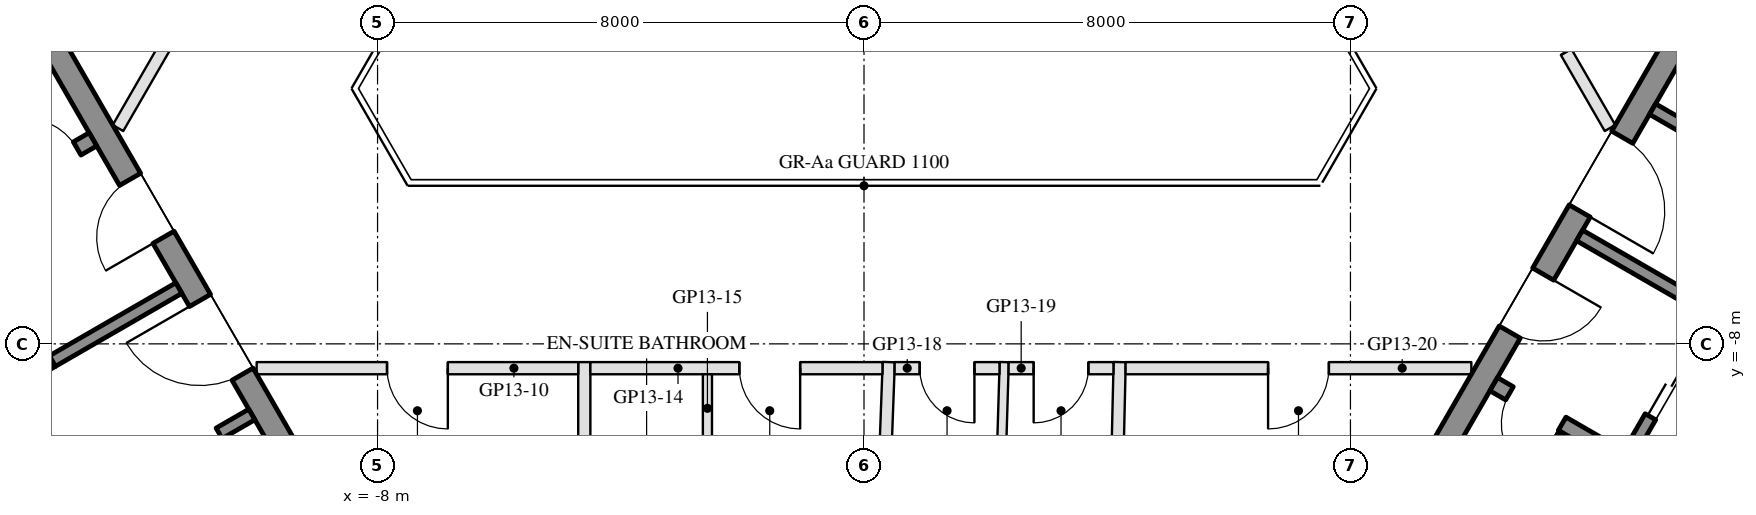
"""IFC4 building model, lengths in metres.
Left out: names, types, materials, properties, quantities, classifications, styles, units other than length and angle.
Written with IfcOpenShell. Run it as: python <this file> out.ifc"""

import sys

from ifc_helpers import new_model, si_unit, direction, frame, frame_2d, origin, place, context, subcontext, project, spatial, rectangle, extrude, element, fill, save


model = new_model("IFC4")
c1 = context("Model", 3, precision=1e-05, world=origin(), true_north=direction((0.0, 1.0)))
c2 = subcontext(c1, "Body", "Model", "MODEL_VIEW")
j1 = project(units=[si_unit("LENGTHUNIT", "METRE"), si_unit("PLANEANGLEUNIT", "RADIAN")], contexts=[c1])
p1 = place(None, origin())
s1 = spatial("IfcSite", under=j1, at=p1, CompositionType="ELEMENT")
p2 = place(p1, origin())
s2 = spatial("IfcBuilding", under=s1, at=p2, CompositionType="ELEMENT")
p3 = place(p2, frame((0.0, 0.0, 157.7)))
s3 = spatial("IfcBuildingStorey", under=s2, at=p3, CompositionType="ELEMENT", Elevation=157.7)
p4 = place(p3, frame((-13.845, -2.22, 0.0), z_axis=(0.0, 0.0, 1.0), x_axis=(0.500004234368, -0.866022959057, 0.0)))
e1 = element("IfcWall", 1, at=p4, inside=s3, PredefinedType="SHEAR", context=c2, shape_type="SweptSolid", body=[
    extrude(rectangle(XDim=10.0, YDim=0.4, at=frame_2d((5.0, 0.0))), origin(), (0.0, 0.0, 1.0), 3.5),
])
p5 = place(p4, frame((3.55, 0.0, 0.0)))
e2 = element("IfcOpeningElement", 2, at=p5, cuts=e1, PredefinedType="OPENING", context=c2, shape_type="SweptSolid", body=[
    extrude(rectangle(XDim=1.1, YDim=2.1, at=frame_2d((0.55, 1.05))), frame((0.0, 0.21, 0.0), z_axis=(0.0, -1.0, 0.0), x_axis=(1.0, 0.0, 0.0)), (0.0, 0.0, 1.0), 0.42),
])
p6 = place(p4, frame((5.85, 0.0, 0.0)))
e3 = element("IfcOpeningElement", 3, at=p6, cuts=e1, PredefinedType="OPENING", context=c2, shape_type="SweptSolid", body=[
    extrude(rectangle(XDim=1.4, YDim=2.1, at=frame_2d((0.7, 1.05))), frame((0.0, 0.21, 0.0), z_axis=(0.0, -1.0, 0.0), x_axis=(1.0, 0.0, 0.0)), (0.0, 0.0, 1.0), 0.42),
])
p7 = place(p3, frame((-12.681, -4.636, 0.0), z_axis=(0.0, 0.0, 1.0), x_axis=(-0.866021702275, -0.500006411147, 0.0)))
e4 = element("IfcWall", 4, at=p7, inside=s3, PredefinedType="SHEAR", context=c2, shape_type="SweptSolid", body=[
    extrude(rectangle(XDim=6.45, YDim=0.25, at=frame_2d((3.225, 0.0))), origin(), (0.0, 0.0, 1.0), 3.5),
])
p8 = place(p7, frame((0.3, 0.0, 0.0)))
e5 = element("IfcOpeningElement", 5, at=p8, cuts=e4, PredefinedType="OPENING", context=c2, shape_type="SweptSolid", body=[
    extrude(rectangle(XDim=1.0, YDim=2.1, at=frame_2d((0.5, 1.05))), frame((0.0, 0.135, 0.0), z_axis=(0.0, -1.0, 0.0), x_axis=(1.0, 0.0, 0.0)), (0.0, 0.0, 1.0), 0.27),
])
p9 = place(p3, frame((-14.783, -5.995, 0.0), z_axis=(0.0, 0.0, 1.0), x_axis=(0.49994636267, -0.866056369097, 0.0)))
e6 = element("IfcWall", 6, at=p9, inside=s3, PredefinedType="SHEAR", context=c2, shape_type="SweptSolid", body=[
    extrude(rectangle(XDim=2.8, YDim=0.2, at=frame_2d((1.4, 0.0))), origin(), (0.0, 0.0, 1.0), 3.5),
])
p10 = place(p9, frame((0.7, 0.0, 0.0)))
e7 = element("IfcOpeningElement", 7, at=p10, cuts=e6, PredefinedType="OPENING", context=c2, shape_type="SweptSolid", body=[
    extrude(rectangle(XDim=1.2, YDim=2.1, at=frame_2d((0.6, 1.05))), frame((0.0, 0.11, 0.0), z_axis=(0.0, -1.0, 0.0), x_axis=(1.0, 0.0, 0.0)), (0.0, 0.0, 1.0), 0.22),
])
p11 = place(p3, frame((-11.268, -7.083, 0.0), z_axis=(0.0, 0.0, 1.0), x_axis=(-0.866050077142, -0.499957262057, 0.0)))
e8 = element("IfcWall", 8, at=p11, inside=s3, PredefinedType="SHEAR", context=c2, shape_type="SweptSolid", body=[
    extrude(rectangle(XDim=2.4, YDim=0.2, at=frame_2d((1.2, 0.0))), origin(), (0.0, 0.0, 1.0), 3.5),
])
p12 = place(p3, frame((-10.068, -9.162, 0.0), z_axis=(0.0, 0.0, 1.0), x_axis=(-0.866032725843, -0.499987317609, 0.0)))
e9 = element("IfcWall", 9, at=p12, inside=s3, PredefinedType="SHEAR", context=c2, shape_type="SweptSolid", body=[
    extrude(rectangle(XDim=10.16, YDim=0.2, at=frame_2d((5.08, 0.0))), origin(), (0.0, 0.0, 1.0), 3.5),
])
p13 = place(p12, frame((0.62, 0.0, 0.0)))
e10 = element("IfcOpeningElement", 10, at=p13, cuts=e9, PredefinedType="OPENING", context=c2, shape_type="SweptSolid", body=[
    extrude(rectangle(XDim=1.1, YDim=2.1, at=frame_2d((0.55, 1.05))), frame((0.0, 0.11, 0.0), z_axis=(0.0, -1.0, 0.0), x_axis=(1.0, 0.0, 0.0)), (0.0, 0.0, 1.0), 0.22),
])
p14 = place(p12, frame((3.16, 0.0, 0.0)))
e11 = element("IfcOpeningElement", 11, at=p14, cuts=e9, PredefinedType="OPENING", context=c2, shape_type="SweptSolid", body=[
    extrude(rectangle(XDim=1.1, YDim=2.1, at=frame_2d((0.55, 1.05))), frame((0.0, 0.11, 0.0), z_axis=(0.0, -1.0, 0.0), x_axis=(1.0, 0.0, 0.0)), (0.0, 0.0, 1.0), 0.22),
])
p15 = place(p12, frame((5.7, 0.0, 0.0)))
e12 = element("IfcOpeningElement", 12, at=p15, cuts=e9, PredefinedType="OPENING", context=c2, shape_type="SweptSolid", body=[
    extrude(rectangle(XDim=1.1, YDim=2.1, at=frame_2d((0.55, 1.05))), frame((0.0, 0.11, 0.0), z_axis=(0.0, -1.0, 0.0), x_axis=(1.0, 0.0, 0.0)), (0.0, 0.0, 1.0), 0.22),
])
p16 = place(p12, frame((8.24, 0.0, 0.0)))
e13 = element("IfcOpeningElement", 13, at=p16, cuts=e9, PredefinedType="OPENING", context=c2, shape_type="SweptSolid", body=[
    extrude(rectangle(XDim=1.1, YDim=2.1, at=frame_2d((0.55, 1.05))), frame((0.0, 0.11, 0.0), z_axis=(0.0, -1.0, 0.0), x_axis=(1.0, 0.0, 0.0)), (0.0, 0.0, 1.0), 0.22),
])
p17 = place(p3, frame((8.845, -10.88, 0.0), z_axis=(0.0, 0.0, 1.0), x_axis=(0.500004234368, 0.866022959057, 0.0)))
e14 = element("IfcWall", 14, at=p17, inside=s3, PredefinedType="SHEAR", context=c2, shape_type="SweptSolid", body=[
    extrude(rectangle(XDim=10.0, YDim=0.4, at=frame_2d((5.0, 0.0))), origin(), (0.0, 0.0, 1.0), 3.5),
])
p18 = place(p17, frame((3.55, 0.0, 0.0)))
e15 = element("IfcOpeningElement", 15, at=p18, cuts=e14, PredefinedType="OPENING", context=c2, shape_type="SweptSolid", body=[
    extrude(rectangle(XDim=1.1, YDim=2.1, at=frame_2d((0.55, 1.05))), frame((0.0, 0.21, 0.0), z_axis=(0.0, -1.0, 0.0), x_axis=(1.0, 0.0, 0.0)), (0.0, 0.0, 1.0), 0.42),
])
p19 = place(p17, frame((5.85, 0.0, 0.0)))
e16 = element("IfcOpeningElement", 16, at=p19, cuts=e14, PredefinedType="OPENING", context=c2, shape_type="SweptSolid", body=[
    extrude(rectangle(XDim=1.4, YDim=2.1, at=frame_2d((0.7, 1.05))), frame((0.0, 0.21, 0.0), z_axis=(0.0, -1.0, 0.0), x_axis=(1.0, 0.0, 0.0)), (0.0, 0.0, 1.0), 0.42),
])
p20 = place(p3, frame((10.356, -8.664, 0.0), z_axis=(0.0, 0.0, 1.0), x_axis=(0.866028629588, -0.499994412703, 0.0)))
e17 = element("IfcWall", 17, at=p20, inside=s3, PredefinedType="SHEAR", context=c2, shape_type="SweptSolid", body=[
    extrude(rectangle(XDim=6.45, YDim=0.25, at=frame_2d((3.225, 0.0))), origin(), (0.0, 0.0, 1.0), 3.5),
])
p21 = place(p20, frame((0.3, 0.0, 0.0)))
e18 = element("IfcOpeningElement", 18, at=p21, cuts=e17, PredefinedType="OPENING", context=c2, shape_type="SweptSolid", body=[
    extrude(rectangle(XDim=1.0, YDim=2.1, at=frame_2d((0.5, 1.05))), frame((0.0, 0.135, 0.0), z_axis=(0.0, -1.0, 0.0), x_axis=(1.0, 0.0, 0.0)), (0.0, 0.0, 1.0), 0.27),
])
p22 = place(p3, frame((12.583, -9.805, 0.0), z_axis=(0.0, 0.0, 1.0), x_axis=(0.49994636267, 0.866056369097, 0.0)))
e19 = element("IfcWall", 19, at=p22, inside=s3, PredefinedType="SHEAR", context=c2, shape_type="SweptSolid", body=[
    extrude(rectangle(XDim=2.8, YDim=0.2, at=frame_2d((1.4, 0.0))), origin(), (0.0, 0.0, 1.0), 3.5),
])
p23 = place(p22, frame((0.7, 0.0, 0.0)))
e20 = element("IfcOpeningElement", 20, at=p23, cuts=e19, PredefinedType="OPENING", context=c2, shape_type="SweptSolid", body=[
    extrude(rectangle(XDim=1.2, YDim=2.1, at=frame_2d((0.6, 1.05))), frame((0.0, 0.11, 0.0), z_axis=(0.0, -1.0, 0.0), x_axis=(1.0, 0.0, 0.0)), (0.0, 0.0, 1.0), 0.22),
])
p24 = place(p3, frame((11.768, -6.217, 0.0), z_axis=(0.0, 0.0, 1.0), x_axis=(0.866050077142, -0.499957262057, 0.0)))
e21 = element("IfcWall", 21, at=p24, inside=s3, PredefinedType="SHEAR", context=c2, shape_type="SweptSolid", body=[
    extrude(rectangle(XDim=2.4, YDim=0.2, at=frame_2d((1.2, 0.0))), origin(), (0.0, 0.0, 1.0), 3.5),
])
p25 = place(p3, frame((12.968, -4.138, 0.0), z_axis=(0.0, 0.0, 1.0), x_axis=(0.866028328073, -0.49999493495, 0.0)))
e22 = element("IfcWall", 22, at=p25, inside=s3, PredefinedType="SHEAR", context=c2, shape_type="SweptSolid", body=[
    extrude(rectangle(XDim=10.16, YDim=0.2, at=frame_2d((5.08, 0.0))), origin(), (0.0, 0.0, 1.0), 3.5),
])
p26 = place(p25, frame((4.53, 0.0, 0.0)))
e23 = element("IfcOpeningElement", 23, at=p26, cuts=e22, PredefinedType="OPENING", context=c2, shape_type="SweptSolid", body=[
    extrude(rectangle(XDim=0.9, YDim=2.1, at=frame_2d((0.45, 1.05))), frame((0.0, 0.11, 0.0), z_axis=(0.0, -1.0, 0.0), x_axis=(1.0, 0.0, 0.0)), (0.0, 0.0, 1.0), 0.22),
])
p27 = place(p3, frame((-4.6, -18.38, 0.0), z_axis=(0.0, 0.0, 1.0), x_axis=(0.0, 1.0, 0.0)))
e24 = element("IfcWall", 24, at=p27, inside=s3, PredefinedType="PARTITIONING", context=c2, shape_type="SweptSolid", body=[
    extrude(rectangle(XDim=10.08, YDim=0.2, at=frame_2d((5.04, 0.0))), origin(), (0.0, 0.0, 1.0), 3.06),
])
p28 = place(p3, frame((0.055, -17.805, 0.0), z_axis=(0.0, 0.0, 1.0), x_axis=(0.037090458059, 0.999311912228, 0.0)))
e25 = element("IfcWall", 25, at=p28, inside=s3, PredefinedType="PARTITIONING", context=c2, shape_type="SweptSolid", body=[
    extrude(rectangle(XDim=9.511, YDim=0.2, at=frame_2d((4.756, 0.0))), origin(), (0.0, 0.0, 1.0), 2.95),
])
p29 = place(p3, frame((3.95, -19.28, 0.0), z_axis=(0.0, 0.0, 1.0), x_axis=(0.023184943176, 0.999731193076, 0.0)))
e26 = element("IfcWall", 26, at=p29, inside=s3, PredefinedType="PARTITIONING", context=c2, shape_type="SweptSolid", body=[
    extrude(rectangle(XDim=10.983, YDim=0.2, at=frame_2d((5.491, 0.0))), origin(), (0.0, 0.0, 1.0), 2.95),
])
p30 = place(p3, frame((-4.7, -8.4, 0.0), z_axis=(0.0, 0.0, 1.0), x_axis=(-1.0, 0.0, 0.0)))
e27 = element("IfcWall", 27, at=p30, inside=s3, PredefinedType="PARTITIONING", context=c2, shape_type="SweptSolid", body=[
    extrude(rectangle(XDim=5.288, YDim=0.2, at=frame_2d((2.644, 0.0))), origin(), (0.0, 0.0, 1.0), 2.95),
])
p31 = place(p30, frame((2.144, 0.0, 0.0)))
e28 = element("IfcOpeningElement", 28, at=p31, cuts=e27, PredefinedType="OPENING", context=c2, shape_type="SweptSolid", body=[
    extrude(rectangle(XDim=1.0, YDim=2.1, at=frame_2d((0.5, 1.05))), frame((0.0, 0.11, 0.0), z_axis=(0.0, -1.0, 0.0), x_axis=(1.0, 0.0, 0.0)), (0.0, 0.0, 1.0), 0.22),
])
p32 = place(p3, frame((0.304, -8.4, 0.0), z_axis=(0.0, 0.0, 1.0), x_axis=(-1.0, 0.0, 0.0)))
e29 = element("IfcWall", 29, at=p32, inside=s3, PredefinedType="PARTITIONING", context=c2, shape_type="SweptSolid", body=[
    extrude(rectangle(XDim=4.804, YDim=0.2, at=frame_2d((2.402, 0.0))), origin(), (0.0, 0.0, 1.0), 2.95),
])
p33 = place(p32, frame((1.354, 0.0, 0.0)))
e30 = element("IfcOpeningElement", 30, at=p33, cuts=e29, PredefinedType="OPENING", context=c2, shape_type="SweptSolid", body=[
    extrude(rectangle(XDim=1.0, YDim=2.1, at=frame_2d((0.5, 1.05))), frame((0.0, 0.11, 0.0), z_axis=(0.0, -1.0, 0.0), x_axis=(1.0, 0.0, 0.0)), (0.0, 0.0, 1.0), 0.22),
])
p34 = place(p3, frame((-2.575, -11.3, 0.0), z_axis=(0.0, 0.0, 1.0), x_axis=(0.0, 1.0, 0.0)))
e31 = element("IfcWall", 31, at=p34, inside=s3, PredefinedType="PARTITIONING", context=c2, shape_type="SweptSolid", body=[
    extrude(rectangle(XDim=2.8, YDim=0.15, at=frame_2d((1.4, 0.0))), origin(), (0.0, 0.0, 1.0), 3.55),
])
p35 = place(p34, frame((0.5, 0.0, 0.0)))
e32 = element("IfcOpeningElement", 32, at=p35, cuts=e31, PredefinedType="OPENING", context=c2, shape_type="SweptSolid", body=[
    extrude(rectangle(XDim=0.9, YDim=2.1, at=frame_2d((0.45, 1.05))), frame((0.0, 0.085, 0.0), z_axis=(0.0, -1.0, 0.0), x_axis=(1.0, 0.0, 0.0)), (0.0, 0.0, 1.0), 0.17),
])
p36 = place(p3, frame((1.975, -19.28, 0.0), z_axis=(0.0, 0.0, 1.0), x_axis=(0.030114853757, 0.999546444935, 0.0)))
e33 = element("IfcWall", 33, at=p36, inside=s3, PredefinedType="PARTITIONING", context=c2, shape_type="SweptSolid", body=[
    extrude(rectangle(XDim=10.985, YDim=0.15, at=frame_2d((5.492, 0.0))), origin(), (0.0, 0.0, 1.0), 3.06),
])
p37 = place(p3, frame((2.228, -8.4, 0.0), z_axis=(0.0, 0.0, 1.0), x_axis=(-1.0, 0.0, 0.0)))
e34 = element("IfcWall", 34, at=p37, inside=s3, PredefinedType="PARTITIONING", context=c2, shape_type="SweptSolid", body=[
    extrude(rectangle(XDim=1.724, YDim=0.2, at=frame_2d((0.862, 0.0))), origin(), (0.0, 0.0, 1.0), 3.55),
])
p38 = place(p37, frame((0.412, 0.0, 0.0)))
e35 = element("IfcOpeningElement", 35, at=p38, cuts=e34, PredefinedType="OPENING", context=c2, shape_type="SweptSolid", body=[
    extrude(rectangle(XDim=0.9, YDim=2.1, at=frame_2d((0.45, 1.05))), frame((0.0, 0.11, 0.0), z_axis=(0.0, -1.0, 0.0), x_axis=(1.0, 0.0, 0.0)), (0.0, 0.0, 1.0), 0.22),
])
p39 = place(p3, frame((4.102, -8.4, 0.0), z_axis=(0.0, 0.0, 1.0), x_axis=(-1.0, 0.0, 0.0)))
e36 = element("IfcWall", 36, at=p39, inside=s3, PredefinedType="PARTITIONING", context=c2, shape_type="SweptSolid", body=[
    extrude(rectangle(XDim=1.724, YDim=0.2, at=frame_2d((0.862, 0.0))), origin(), (0.0, 0.0, 1.0), 2.95),
])
p40 = place(p39, frame((0.412, 0.0, 0.0)))
e37 = element("IfcOpeningElement", 37, at=p40, cuts=e36, PredefinedType="OPENING", context=c2, shape_type="SweptSolid", body=[
    extrude(rectangle(XDim=0.9, YDim=2.1, at=frame_2d((0.45, 1.05))), frame((0.0, 0.11, 0.0), z_axis=(0.0, -1.0, 0.0), x_axis=(1.0, 0.0, 0.0)), (0.0, 0.0, 1.0), 0.22),
])
p41 = place(p3, frame((9.988, -8.4, 0.0), z_axis=(0.0, 0.0, 1.0), x_axis=(-1.0, 0.0, 0.0)))
e38 = element("IfcWall", 38, at=p41, inside=s3, PredefinedType="PARTITIONING", context=c2, shape_type="SweptSolid", body=[
    extrude(rectangle(XDim=5.686, YDim=0.2, at=frame_2d((2.843, 0.0))), origin(), (0.0, 0.0, 1.0), 2.95),
])
p42 = place(p41, frame((2.343, 0.0, 0.0)))
e39 = element("IfcOpeningElement", 39, at=p42, cuts=e38, PredefinedType="OPENING", context=c2, shape_type="SweptSolid", body=[
    extrude(rectangle(XDim=1.0, YDim=2.1, at=frame_2d((0.5, 1.05))), frame((0.0, 0.11, 0.0), z_axis=(0.0, -1.0, 0.0), x_axis=(1.0, 0.0, 0.0)), (0.0, 0.0, 1.0), 0.22),
])
p43 = place(p3, frame((10.325, -1.083, 0.0), z_axis=(0.0, 0.0, 1.0), x_axis=(0.500008716408, -0.866020371305, 0.0)))
e40 = element("IfcWall", 40, at=p43, inside=s3, PredefinedType="PARTITIONING", context=c2, shape_type="SweptSolid", body=[
    extrude(rectangle(XDim=3.888, YDim=0.2, at=frame_2d((1.944, 0.0))), origin(), (0.0, 0.0, 1.0), 2.95),
])
p44 = place(p43, frame((1.444, 0.0, 0.0)))
e41 = element("IfcOpeningElement", 41, at=p44, cuts=e40, PredefinedType="OPENING", context=c2, shape_type="SweptSolid", body=[
    extrude(rectangle(XDim=1.0, YDim=2.1, at=frame_2d((0.5, 1.05))), frame((0.0, 0.11, 0.0), z_axis=(0.0, -1.0, 0.0), x_axis=(1.0, 0.0, 0.0)), (0.0, 0.0, 1.0), 0.22),
])
p45 = place(p3, frame((-12.269, -4.45, 0.0), z_axis=(0.0, 0.0, 1.0), x_axis=(0.500011931275, 0.86601851515, 0.0)))
e42 = element("IfcWall", 42, at=p45, inside=s3, PredefinedType="PARTITIONING", context=c2, shape_type="SweptSolid", body=[
    extrude(rectangle(XDim=4.088, YDim=0.2, at=frame_2d((2.044, 0.0))), origin(), (0.0, 0.0, 1.0), 2.95),
])
p46 = place(p45, frame((1.544, 0.0, 0.0)))
e43 = element("IfcOpeningElement", 43, at=p46, cuts=e42, PredefinedType="OPENING", context=c2, shape_type="SweptSolid", body=[
    extrude(rectangle(XDim=1.0, YDim=2.1, at=frame_2d((0.5, 1.05))), frame((0.0, 0.11, 0.0), z_axis=(0.0, -1.0, 0.0), x_axis=(1.0, 0.0, 0.0)), (0.0, 0.0, 1.0), 0.22),
])
p47 = place(p13, origin())
e44 = element("IfcDoor", 44, at=p47, inside=s3, OperationType="DOUBLE_DOOR_SLIDING", PredefinedType="DOOR", context=c2, shape_type="SweptSolid", body=[
    extrude(rectangle(XDim=1.1, YDim=2.1, at=frame_2d((0.55, 1.05))), frame((0.0, 0.025, 0.0), z_axis=(0.0, -1.0, 0.0), x_axis=(1.0, 0.0, 0.0)), (0.0, 0.0, 1.0), 0.05),
])
fill(e10, e44)
p48 = place(p5, frame((1.1, 0.0, 0.0), z_axis=(0.0, 0.0, 1.0), x_axis=(-1.0, 0.0, 0.0)))
e45 = element("IfcDoor", 45, at=p48, inside=s3, OperationType="SINGLE_SWING_LEFT", PredefinedType="DOOR", context=c2, shape_type="SweptSolid", body=[
    extrude(rectangle(XDim=1.1, YDim=2.1, at=frame_2d((0.55, 1.05))), frame((0.0, 0.025, 0.0), z_axis=(0.0, -1.0, 0.0), x_axis=(1.0, 0.0, 0.0)), (0.0, 0.0, 1.0), 0.05),
])
fill(e2, e45)
p49 = place(p6, frame((1.4, 0.0, 0.0), z_axis=(0.0, 0.0, 1.0), x_axis=(-1.0, 0.0, 0.0)))
e46 = element("IfcDoor", 46, at=p49, inside=s3, OperationType="DOUBLE_DOOR_SINGLE_SWING", PredefinedType="DOOR", context=c2, shape_type="SweptSolid", body=[
    extrude(rectangle(XDim=1.4, YDim=2.1, at=frame_2d((0.7, 1.05))), frame((0.0, 0.025, 0.0), z_axis=(0.0, -1.0, 0.0), x_axis=(1.0, 0.0, 0.0)), (0.0, 0.0, 1.0), 0.05),
])
fill(e3, e46)
p50 = place(p8, frame((1.0, 0.0, 0.0), z_axis=(0.0, 0.0, 1.0), x_axis=(-1.0, 0.0, 0.0)))
e47 = element("IfcDoor", 47, at=p50, inside=s3, OperationType="SINGLE_SWING_LEFT", PredefinedType="DOOR", context=c2, shape_type="SweptSolid", body=[
    extrude(rectangle(XDim=1.0, YDim=2.1, at=frame_2d((0.5, 1.05))), frame((0.0, 0.025, 0.0), z_axis=(0.0, -1.0, 0.0), x_axis=(1.0, 0.0, 0.0)), (0.0, 0.0, 1.0), 0.05),
])
fill(e5, e47)
p51 = place(p23, origin())
e48 = element("IfcDoor", 48, at=p51, inside=s3, OperationType="DOUBLE_DOOR_SLIDING", PredefinedType="DOOR", context=c2, shape_type="SweptSolid", body=[
    extrude(rectangle(XDim=1.2, YDim=2.1, at=frame_2d((0.6, 1.05))), frame((0.0, 0.025, 0.0), z_axis=(0.0, -1.0, 0.0), x_axis=(1.0, 0.0, 0.0)), (0.0, 0.0, 1.0), 0.05),
])
fill(e20, e48)
p52 = place(p18, frame((1.1, 0.0, 0.0), z_axis=(0.0, 0.0, 1.0), x_axis=(-1.0, 0.0, 0.0)))
e49 = element("IfcDoor", 49, at=p52, inside=s3, OperationType="SINGLE_SWING_LEFT", PredefinedType="DOOR", context=c2, shape_type="SweptSolid", body=[
    extrude(rectangle(XDim=1.1, YDim=2.1, at=frame_2d((0.55, 1.05))), frame((0.0, 0.025, 0.0), z_axis=(0.0, -1.0, 0.0), x_axis=(1.0, 0.0, 0.0)), (0.0, 0.0, 1.0), 0.05),
])
fill(e15, e49)
p53 = place(p19, frame((1.4, 0.0, 0.0), z_axis=(0.0, 0.0, 1.0), x_axis=(-1.0, 0.0, 0.0)))
e50 = element("IfcDoor", 50, at=p53, inside=s3, OperationType="DOUBLE_DOOR_SINGLE_SWING", PredefinedType="DOOR", context=c2, shape_type="SweptSolid", body=[
    extrude(rectangle(XDim=1.4, YDim=2.1, at=frame_2d((0.7, 1.05))), frame((0.0, 0.025, 0.0), z_axis=(0.0, -1.0, 0.0), x_axis=(1.0, 0.0, 0.0)), (0.0, 0.0, 1.0), 0.05),
])
fill(e16, e50)
p54 = place(p21, frame((1.0, 0.0, 0.0), z_axis=(0.0, 0.0, 1.0), x_axis=(-1.0, 0.0, 0.0)))
e51 = element("IfcDoor", 51, at=p54, inside=s3, OperationType="SINGLE_SWING_LEFT", PredefinedType="DOOR", context=c2, shape_type="SweptSolid", body=[
    extrude(rectangle(XDim=1.0, YDim=2.1, at=frame_2d((0.5, 1.05))), frame((0.0, 0.025, 0.0), z_axis=(0.0, -1.0, 0.0), x_axis=(1.0, 0.0, 0.0)), (0.0, 0.0, 1.0), 0.05),
])
fill(e18, e51)
p55 = place(p31, origin())
e52 = element("IfcDoor", 52, at=p55, inside=s3, OperationType="SINGLE_SWING_LEFT", PredefinedType="DOOR", context=c2, shape_type="SweptSolid", body=[
    extrude(rectangle(XDim=1.0, YDim=2.1, at=frame_2d((0.5, 1.05))), frame((0.0, 0.025, 0.0), z_axis=(0.0, -1.0, 0.0), x_axis=(1.0, 0.0, 0.0)), (0.0, 0.0, 1.0), 0.05),
])
fill(e28, e52)
p56 = place(p33, origin())
e53 = element("IfcDoor", 53, at=p56, inside=s3, OperationType="SINGLE_SWING_LEFT", PredefinedType="DOOR", context=c2, shape_type="SweptSolid", body=[
    extrude(rectangle(XDim=1.0, YDim=2.1, at=frame_2d((0.5, 1.05))), frame((0.0, 0.025, 0.0), z_axis=(0.0, -1.0, 0.0), x_axis=(1.0, 0.0, 0.0)), (0.0, 0.0, 1.0), 0.05),
])
fill(e30, e53)
p57 = place(p38, origin())
e54 = element("IfcDoor", 54, at=p57, inside=s3, OperationType="SINGLE_SWING_LEFT", PredefinedType="DOOR", context=c2, shape_type="SweptSolid", body=[
    extrude(rectangle(XDim=0.9, YDim=2.1, at=frame_2d((0.45, 1.05))), frame((0.0, 0.025, 0.0), z_axis=(0.0, -1.0, 0.0), x_axis=(1.0, 0.0, 0.0)), (0.0, 0.0, 1.0), 0.05),
])
fill(e35, e54)
p58 = place(p40, origin())
e55 = element("IfcDoor", 55, at=p58, inside=s3, OperationType="SINGLE_SWING_RIGHT", PredefinedType="DOOR", context=c2, shape_type="SweptSolid", body=[
    extrude(rectangle(XDim=0.9, YDim=2.1, at=frame_2d((0.45, 1.05))), frame((0.0, 0.025, 0.0), z_axis=(0.0, -1.0, 0.0), x_axis=(1.0, 0.0, 0.0)), (0.0, 0.0, 1.0), 0.05),
])
fill(e37, e55)
p59 = place(p42, origin())
e56 = element("IfcDoor", 56, at=p59, inside=s3, OperationType="SINGLE_SWING_RIGHT", PredefinedType="DOOR", context=c2, shape_type="SweptSolid", body=[
    extrude(rectangle(XDim=1.0, YDim=2.1, at=frame_2d((0.5, 1.05))), frame((0.0, 0.025, 0.0), z_axis=(0.0, -1.0, 0.0), x_axis=(1.0, 0.0, 0.0)), (0.0, 0.0, 1.0), 0.05),
])
fill(e39, e56)
p60 = place(p44, origin())
e57 = element("IfcDoor", 57, at=p60, inside=s3, OperationType="SINGLE_SWING_LEFT", PredefinedType="DOOR", context=c2, shape_type="SweptSolid", body=[
    extrude(rectangle(XDim=1.0, YDim=2.1, at=frame_2d((0.5, 1.05))), frame((0.0, 0.025, 0.0), z_axis=(0.0, -1.0, 0.0), x_axis=(1.0, 0.0, 0.0)), (0.0, 0.0, 1.0), 0.05),
])
fill(e41, e57)
save(model, sys.argv[1])
